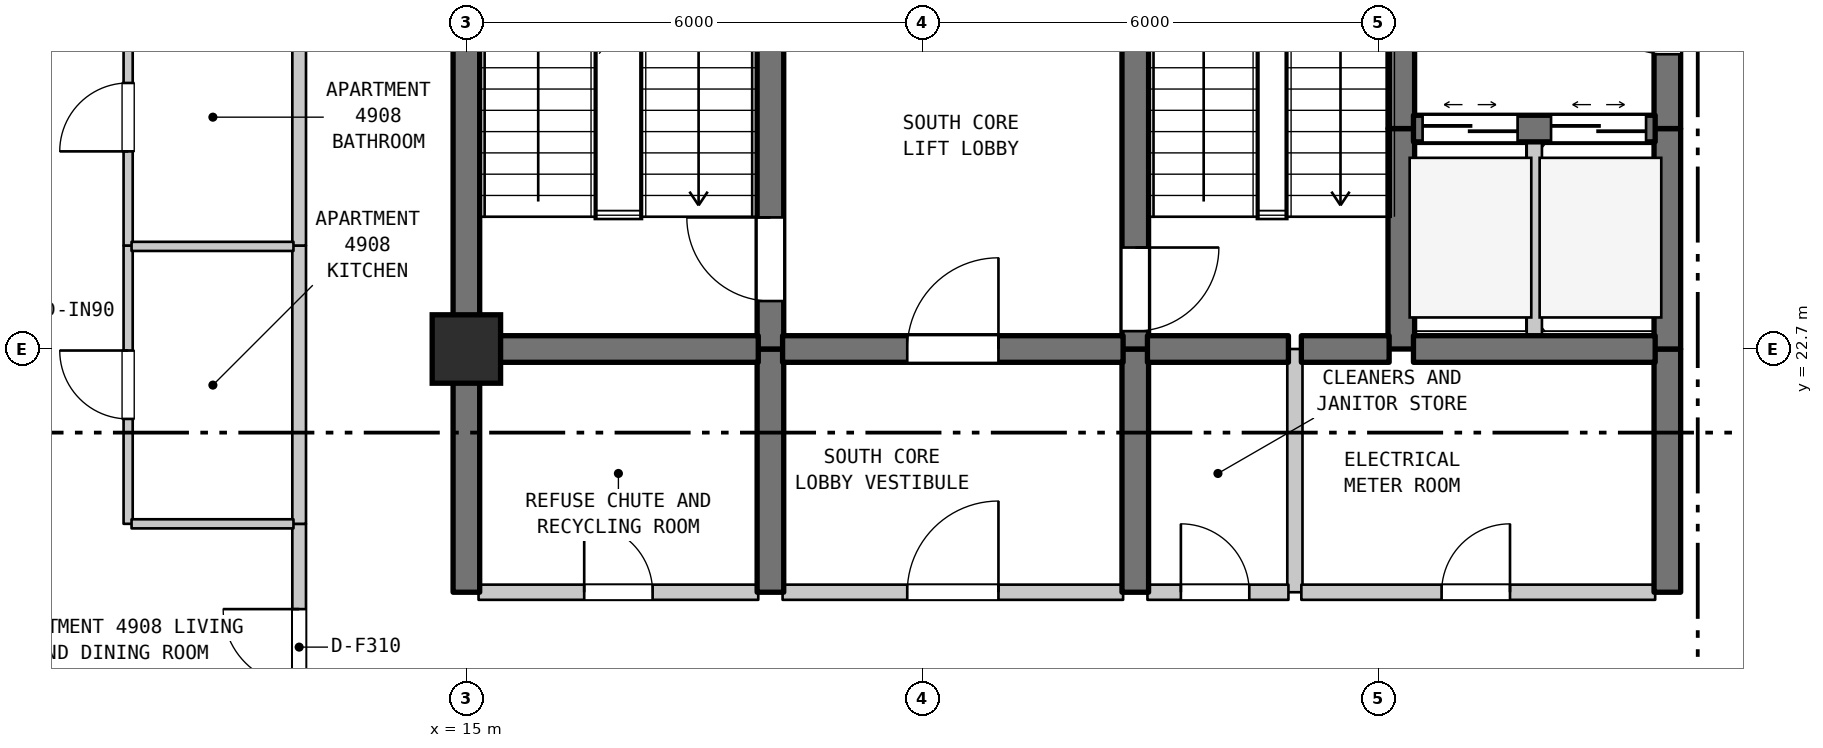
"""IFC4 building model, lengths in metres.
Left out: names, types, materials, properties, quantities, classifications, styles, units other than length and angle.
Written with IfcOpenShell. Run it as: python <this file> out.ifc"""

import sys

from ifc_helpers import new_model, si_unit, direction, frame, frame_2d, origin, origin_2d, place, context, subcontext, project, spatial, rectangle, extrude, element, fill, save


model = new_model("IFC4")
c1 = context("Model", 3, precision=1e-05, world=origin(), true_north=direction((0.0, 1.0)))
c2 = subcontext(c1, "Body", "Model", "MODEL_VIEW")
j1 = project(units=[si_unit("LENGTHUNIT", "METRE"), si_unit("PLANEANGLEUNIT", "RADIAN")], contexts=[c1])
p1 = place(None, origin())
s1 = spatial("IfcSite", under=j1, at=p1, CompositionType="ELEMENT")
p2 = place(p1, origin())
s2 = spatial("IfcBuilding", under=s1, at=p2, CompositionType="ELEMENT")
p3 = place(p2, frame((0.0, 0.0, 199.5)))
s3 = spatial("IfcBuildingStorey", under=s2, at=p3, CompositionType="ELEMENT", Elevation=199.5)
p4 = place(p3, frame((15.0, 22.7, 0.0), z_axis=(0.0, 0.0, 1.0), x_axis=(1.0, 0.0, 0.0)))
e1 = element("IfcColumn", 1, at=p4, inside=s3, PredefinedType="COLUMN", context=c2, shape_type="SweptSolid", body=[
    extrude(rectangle(XDim=0.9, YDim=0.9, at=origin_2d()), origin(), (0.0, 0.0, 1.0), 3.7),
])
p5 = place(p3, frame((10.55, 20.4, 0.0), z_axis=(0.0, 0.0, 1.0), x_axis=(0.0, 1.0, 0.0)))
e2 = element("IfcWall", 2, at=p5, inside=s3, PredefinedType="PARTITIONING", context=c2, shape_type="SweptSolid", body=[
    extrude(rectangle(XDim=3.661, YDim=0.12, at=frame_2d((1.831, 0.0))), origin(), (0.0, 0.0, 1.0), 3.39),
])
p6 = place(p5, frame((1.38, 0.0, 0.0)))
e3 = element("IfcOpeningElement", 3, at=p6, cuts=e2, PredefinedType="OPENING", context=c2, shape_type="SweptSolid", body=[
    extrude(rectangle(XDim=0.9, YDim=2.15, at=frame_2d((0.45, 1.075))), frame((0.0, 0.07, 0.0), z_axis=(0.0, -1.0, 0.0), x_axis=(1.0, 0.0, 0.0)), (0.0, 0.0, 1.0), 0.14),
])
p7 = place(p3, frame((10.55, 24.061, 0.0), z_axis=(0.0, 0.0, 1.0), x_axis=(0.0, 1.0, 0.0)))
e4 = element("IfcWall", 4, at=p7, inside=s3, PredefinedType="PARTITIONING", context=c2, shape_type="SweptSolid", body=[
    extrude(rectangle(XDim=3.379, YDim=0.12, at=frame_2d((1.689, 0.0))), origin(), (0.0, 0.0, 1.0), 3.39),
])
p8 = place(p7, frame((1.239, 0.0, 0.0)))
e5 = element("IfcOpeningElement", 5, at=p8, cuts=e4, PredefinedType="OPENING", context=c2, shape_type="SweptSolid", body=[
    extrude(rectangle(XDim=0.9, YDim=2.1, at=frame_2d((0.45, 1.05))), frame((0.0, 0.07, 0.0), z_axis=(0.0, -1.0, 0.0), x_axis=(1.0, 0.0, 0.0)), (0.0, 0.0, 1.0), 0.14),
])
p9 = place(p3, frame((12.8, 17.3, 0.0), z_axis=(0.0, 0.0, 1.0), x_axis=(0.0, 1.0, 0.0)))
e6 = element("IfcWall", 6, at=p9, inside=s3, PredefinedType="STANDARD", context=c2, shape_type="SweptSolid", body=[
    extrude(rectangle(XDim=3.1, YDim=0.18, at=frame_2d((1.55, 0.0))), origin(), (0.0, 0.0, 1.0), 3.39),
])
p10 = place(p9, frame((0.978, 0.0, 0.0)))
e7 = element("IfcOpeningElement", 7, at=p10, cuts=e6, PredefinedType="OPENING", context=c2, shape_type="SweptSolid", body=[
    extrude(rectangle(XDim=1.0, YDim=2.15, at=frame_2d((0.5, 1.075))), frame((0.0, 0.1, 0.0), z_axis=(0.0, -1.0, 0.0), x_axis=(1.0, 0.0, 0.0)), (0.0, 0.0, 1.0), 0.2),
])
p11 = place(p3, frame((12.8, 20.4, 0.0), z_axis=(0.0, 0.0, 1.0), x_axis=(0.0, 1.0, 0.0)))
e8 = element("IfcWall", 8, at=p11, inside=s3, PredefinedType="STANDARD", context=c2, shape_type="SweptSolid", body=[
    extrude(rectangle(XDim=3.661, YDim=0.18, at=frame_2d((1.831, 0.0))), origin(), (0.0, 0.0, 1.0), 3.39),
])
p12 = place(p3, frame((12.8, 24.061, 0.0), z_axis=(0.0, 0.0, 1.0), x_axis=(0.0, 1.0, 0.0)))
e9 = element("IfcWall", 9, at=p12, inside=s3, PredefinedType="STANDARD", context=c2, shape_type="SweptSolid", body=[
    extrude(rectangle(XDim=3.379, YDim=0.18, at=frame_2d((1.689, 0.0))), origin(), (0.0, 0.0, 1.0), 3.39),
])
p13 = place(p3, frame((15.0, 19.5, 0.0), z_axis=(0.0, 0.0, 1.0), x_axis=(0.0, 1.0, 0.0)))
e10 = element("IfcWall", 10, at=p13, inside=s3, PredefinedType="SHEAR", context=c2, shape_type="SweptSolid", body=[
    extrude(rectangle(XDim=3.2, YDim=0.35, at=frame_2d((1.6, 0.0))), origin(), (0.0, 0.0, 1.0), 3.39),
])
p14 = place(p3, frame((15.0, 22.7, 0.0), z_axis=(0.0, 0.0, 1.0), x_axis=(0.0, 1.0, 0.0)))
e11 = element("IfcWall", 11, at=p14, inside=s3, PredefinedType="SHEAR", context=c2, shape_type="SweptSolid", body=[
    extrude(rectangle(XDim=6.8, YDim=0.35, at=frame_2d((3.4, 0.0))), origin(), (0.0, 0.0, 1.0), 3.39),
])
p15 = place(p3, frame((19.0, 19.5, 0.0), z_axis=(0.0, 0.0, 1.0), x_axis=(0.0, 1.0, 0.0)))
e12 = element("IfcWall", 12, at=p15, inside=s3, PredefinedType="SHEAR", context=c2, shape_type="SweptSolid", body=[
    extrude(rectangle(XDim=3.2, YDim=0.35, at=frame_2d((1.6, 0.0))), origin(), (0.0, 0.0, 1.0), 3.39),
])
p16 = place(p3, frame((19.0, 22.7, 0.0), z_axis=(0.0, 0.0, 1.0), x_axis=(0.0, 1.0, 0.0)))
e13 = element("IfcWall", 13, at=p16, inside=s3, PredefinedType="SHEAR", context=c2, shape_type="SweptSolid", body=[
    extrude(rectangle(XDim=5.5, YDim=0.35, at=frame_2d((2.75, 0.0))), origin(), (0.0, 0.0, 1.0), 3.39),
])
p17 = place(p16, frame((0.631, 0.0, 0.0)))
e14 = element("IfcOpeningElement", 14, at=p17, cuts=e13, PredefinedType="OPENING", context=c2, shape_type="SweptSolid", body=[
    extrude(rectangle(XDim=1.1, YDim=2.15, at=frame_2d((0.55, 1.075))), frame((0.0, 0.185, 0.0), z_axis=(0.0, -1.0, 0.0), x_axis=(1.0, 0.0, 0.0)), (0.0, 0.0, 1.0), 0.37),
])
p18 = place(p3, frame((23.8, 19.5, 0.0), z_axis=(0.0, 0.0, 1.0), x_axis=(0.0, 1.0, 0.0)))
e15 = element("IfcWall", 15, at=p18, inside=s3, PredefinedType="SHEAR", context=c2, shape_type="SweptSolid", body=[
    extrude(rectangle(XDim=3.2, YDim=0.35, at=frame_2d((1.6, 0.0))), origin(), (0.0, 0.0, 1.0), 3.39),
])
p19 = place(p3, frame((23.8, 22.7, 0.0), z_axis=(0.0, 0.0, 1.0), x_axis=(0.0, 1.0, 0.0)))
e16 = element("IfcWall", 16, at=p19, inside=s3, PredefinedType="SHEAR", context=c2, shape_type="SweptSolid", body=[
    extrude(rectangle(XDim=5.5, YDim=0.35, at=frame_2d((2.75, 0.0))), origin(), (0.0, 0.0, 1.0), 3.39),
])
p20 = place(p19, frame((0.235, 0.0, 0.0)))
e17 = element("IfcOpeningElement", 17, at=p20, cuts=e16, PredefinedType="OPENING", context=c2, shape_type="SweptSolid", body=[
    extrude(rectangle(XDim=1.1, YDim=2.15, at=frame_2d((0.55, 1.075))), frame((0.0, 0.185, 0.0), z_axis=(0.0, -1.0, 0.0), x_axis=(1.0, 0.0, 0.0)), (0.0, 0.0, 1.0), 0.37),
])
p21 = place(p3, frame((25.9, 19.5, 0.0), z_axis=(0.0, 0.0, 1.0), x_axis=(0.0, 1.0, 0.0)))
e18 = element("IfcWall", 18, at=p21, inside=s3, PredefinedType="STANDARD", context=c2, shape_type="SweptSolid", body=[
    extrude(rectangle(XDim=3.2, YDim=0.2, at=frame_2d((1.6, 0.0))), origin(), (0.0, 0.0, 1.0), 3.39),
])
p22 = place(p3, frame((27.3, 22.7, 0.0), z_axis=(0.0, 0.0, 1.0), x_axis=(0.0, 1.0, 0.0)))
e19 = element("IfcWall", 19, at=p22, inside=s3, PredefinedType="SHEAR", context=c2, shape_type="SweptSolid", body=[
    extrude(rectangle(XDim=2.9, YDim=0.35, at=frame_2d((1.45, 0.0))), origin(), (0.0, 0.0, 1.0), 3.39),
])
p23 = place(p3, frame((27.3, 25.6, 0.0), z_axis=(0.0, 0.0, 1.0), x_axis=(0.0, 1.0, 0.0)))
e20 = element("IfcWall", 20, at=p23, inside=s3, PredefinedType="SHEAR", context=c2, shape_type="SweptSolid", body=[
    extrude(rectangle(XDim=3.3, YDim=0.35, at=frame_2d((1.65, 0.0))), origin(), (0.0, 0.0, 1.0), 3.39),
])
p24 = place(p3, frame((29.05, 22.7, 0.0), z_axis=(0.0, 0.0, 1.0), x_axis=(0.0, 1.0, 0.0)))
e21 = element("IfcWall", 21, at=p24, inside=s3, PredefinedType="STANDARD", context=c2, shape_type="SweptSolid", body=[
    extrude(rectangle(XDim=2.9, YDim=0.2, at=frame_2d((1.45, 0.0))), origin(), (0.0, 0.0, 1.0), 3.39),
])
p25 = place(p3, frame((30.8, 19.5, 0.0), z_axis=(0.0, 0.0, 1.0), x_axis=(0.0, 1.0, 0.0)))
e22 = element("IfcWall", 22, at=p25, inside=s3, PredefinedType="SHEAR", context=c2, shape_type="SweptSolid", body=[
    extrude(rectangle(XDim=3.2, YDim=0.35, at=frame_2d((1.6, 0.0))), origin(), (0.0, 0.0, 1.0), 3.39),
])
p26 = place(p3, frame((30.8, 22.7, 0.0), z_axis=(0.0, 0.0, 1.0), x_axis=(0.0, 1.0, 0.0)))
e23 = element("IfcWall", 23, at=p26, inside=s3, PredefinedType="SHEAR", context=c2, shape_type="SweptSolid", body=[
    extrude(rectangle(XDim=2.9, YDim=0.35, at=frame_2d((1.45, 0.0))), origin(), (0.0, 0.0, 1.0), 3.39),
])
p27 = place(p3, frame((30.8, 25.6, 0.0), z_axis=(0.0, 0.0, 1.0), x_axis=(0.0, 1.0, 0.0)))
e24 = element("IfcWall", 24, at=p27, inside=s3, PredefinedType="SHEAR", context=c2, shape_type="SweptSolid", body=[
    extrude(rectangle(XDim=3.3, YDim=0.35, at=frame_2d((1.65, 0.0))), origin(), (0.0, 0.0, 1.0), 3.39),
])
p28 = place(p27, frame((0.978, 0.0, 0.0)))
e25 = element("IfcOpeningElement", 25, at=p28, cuts=e24, PredefinedType="OPENING", context=c2, shape_type="SweptSolid", body=[
    extrude(rectangle(XDim=1.2, YDim=2.2, at=frame_2d((0.6, 1.1))), frame((0.0, 0.185, 0.0), z_axis=(0.0, -1.0, 0.0), x_axis=(1.0, 0.0, 0.0)), (0.0, 0.0, 1.0), 0.37),
])
p29 = place(p3, frame((15.16, 19.5, 0.0), z_axis=(0.0, 0.0, 1.0), x_axis=(1.0, 0.0, 0.0)))
e26 = element("IfcWall", 26, at=p29, inside=s3, PredefinedType="STANDARD", context=c2, shape_type="SweptSolid", body=[
    extrude(rectangle(XDim=3.68, YDim=0.2, at=frame_2d((1.84, 0.0))), origin(), (0.0, 0.0, 1.0), 3.39),
])
p30 = place(p29, frame((1.39, 0.0, 0.0)))
e27 = element("IfcOpeningElement", 27, at=p30, cuts=e26, PredefinedType="OPENING", context=c2, shape_type="SweptSolid", body=[
    extrude(rectangle(XDim=0.9, YDim=2.15, at=frame_2d((0.45, 1.075))), frame((0.0, 0.11, 0.0), z_axis=(0.0, -1.0, 0.0), x_axis=(1.0, 0.0, 0.0)), (0.0, 0.0, 1.0), 0.22),
])
p31 = place(p3, frame((19.16, 19.5, 0.0), z_axis=(0.0, 0.0, 1.0), x_axis=(1.0, 0.0, 0.0)))
e28 = element("IfcWall", 28, at=p31, inside=s3, PredefinedType="STANDARD", context=c2, shape_type="SweptSolid", body=[
    extrude(rectangle(XDim=4.48, YDim=0.2, at=frame_2d((2.24, 0.0))), origin(), (0.0, 0.0, 1.0), 3.39),
])
p32 = place(p31, frame((1.64, 0.0, 0.0)))
e29 = element("IfcOpeningElement", 29, at=p32, cuts=e28, PredefinedType="OPENING", context=c2, shape_type="SweptSolid", body=[
    extrude(rectangle(XDim=1.2, YDim=2.2, at=frame_2d((0.6, 1.1))), frame((0.0, 0.11, 0.0), z_axis=(0.0, -1.0, 0.0), x_axis=(1.0, 0.0, 0.0)), (0.0, 0.0, 1.0), 0.22),
])
p33 = place(p3, frame((23.96, 19.5, 0.0), z_axis=(0.0, 0.0, 1.0), x_axis=(1.0, 0.0, 0.0)))
e30 = element("IfcWall", 30, at=p33, inside=s3, PredefinedType="STANDARD", context=c2, shape_type="SweptSolid", body=[
    extrude(rectangle(XDim=1.855, YDim=0.2, at=frame_2d((0.927, 0.0))), origin(), (0.0, 0.0, 1.0), 3.39),
])
p34 = place(p33, frame((0.44, 0.0, 0.0)))
e31 = element("IfcOpeningElement", 31, at=p34, cuts=e30, PredefinedType="OPENING", context=c2, shape_type="SweptSolid", body=[
    extrude(rectangle(XDim=0.9, YDim=2.15, at=frame_2d((0.45, 1.075))), frame((0.0, 0.11, 0.0), z_axis=(0.0, -1.0, 0.0), x_axis=(1.0, 0.0, 0.0)), (0.0, 0.0, 1.0), 0.22),
])
p35 = place(p3, frame((25.985, 19.5, 0.0), z_axis=(0.0, 0.0, 1.0), x_axis=(1.0, 0.0, 0.0)))
e32 = element("IfcWall", 32, at=p35, inside=s3, PredefinedType="STANDARD", context=c2, shape_type="SweptSolid", body=[
    extrude(rectangle(XDim=4.655, YDim=0.2, at=frame_2d((2.327, 0.0))), origin(), (0.0, 0.0, 1.0), 3.39),
])
p36 = place(p35, frame((1.845, 0.0, 0.0)))
e33 = element("IfcOpeningElement", 33, at=p36, cuts=e32, PredefinedType="OPENING", context=c2, shape_type="SweptSolid", body=[
    extrude(rectangle(XDim=0.9, YDim=2.15, at=frame_2d((0.45, 1.075))), frame((0.0, 0.11, 0.0), z_axis=(0.0, -1.0, 0.0), x_axis=(1.0, 0.0, 0.0)), (0.0, 0.0, 1.0), 0.22),
])
p37 = place(p3, frame((10.595, 20.4, 0.0), z_axis=(0.0, 0.0, 1.0), x_axis=(1.0, 0.0, 0.0)))
e34 = element("IfcWall", 34, at=p37, inside=s3, PredefinedType="PARTITIONING", context=c2, shape_type="SweptSolid", body=[
    extrude(rectangle(XDim=2.13, YDim=0.12, at=frame_2d((1.065, 0.0))), origin(), (0.0, 0.0, 1.0), 3.39),
])
p38 = place(p3, frame((15.16, 22.7, 0.0), z_axis=(0.0, 0.0, 1.0), x_axis=(1.0, 0.0, 0.0)))
e35 = element("IfcWall", 35, at=p38, inside=s3, PredefinedType="SHEAR", context=c2, shape_type="SweptSolid", body=[
    extrude(rectangle(XDim=3.68, YDim=0.35, at=frame_2d((1.84, 0.0))), origin(), (0.0, 0.0, 1.0), 3.39),
])
p39 = place(p3, frame((19.16, 22.7, 0.0), z_axis=(0.0, 0.0, 1.0), x_axis=(1.0, 0.0, 0.0)))
e36 = element("IfcWall", 36, at=p39, inside=s3, PredefinedType="SHEAR", context=c2, shape_type="SweptSolid", body=[
    extrude(rectangle(XDim=4.48, YDim=0.35, at=frame_2d((2.24, 0.0))), origin(), (0.0, 0.0, 1.0), 3.39),
])
p40 = place(p39, frame((1.64, 0.0, 0.0)))
e37 = element("IfcOpeningElement", 37, at=p40, cuts=e36, PredefinedType="OPENING", context=c2, shape_type="SweptSolid", body=[
    extrude(rectangle(XDim=1.2, YDim=2.2, at=frame_2d((0.6, 1.1))), frame((0.0, 0.185, 0.0), z_axis=(0.0, -1.0, 0.0), x_axis=(1.0, 0.0, 0.0)), (0.0, 0.0, 1.0), 0.37),
])
p41 = place(p3, frame((23.96, 22.7, 0.0), z_axis=(0.0, 0.0, 1.0), x_axis=(1.0, 0.0, 0.0)))
e38 = element("IfcWall", 38, at=p41, inside=s3, PredefinedType="SHEAR", context=c2, shape_type="SweptSolid", body=[
    extrude(rectangle(XDim=1.855, YDim=0.35, at=frame_2d((0.927, 0.0))), origin(), (0.0, 0.0, 1.0), 3.39),
])
p42 = place(p3, frame((25.985, 22.7, 0.0), z_axis=(0.0, 0.0, 1.0), x_axis=(1.0, 0.0, 0.0)))
e39 = element("IfcWall", 39, at=p42, inside=s3, PredefinedType="SHEAR", context=c2, shape_type="SweptSolid", body=[
    extrude(rectangle(XDim=1.155, YDim=0.35, at=frame_2d((0.577, 0.0))), origin(), (0.0, 0.0, 1.0), 3.39),
])
p43 = place(p3, frame((27.46, 22.7, 0.0), z_axis=(0.0, 0.0, 1.0), x_axis=(1.0, 0.0, 0.0)))
e40 = element("IfcWall", 40, at=p43, inside=s3, PredefinedType="SHEAR", context=c2, shape_type="SweptSolid", body=[
    extrude(rectangle(XDim=3.18, YDim=0.35, at=frame_2d((1.59, 0.0))), origin(), (0.0, 0.0, 1.0), 3.39),
])
p44 = place(p3, frame((10.595, 24.05, 0.0), z_axis=(0.0, 0.0, 1.0), x_axis=(1.0, 0.0, 0.0)))
e41 = element("IfcWall", 41, at=p44, inside=s3, PredefinedType="PARTITIONING", context=c2, shape_type="SweptSolid", body=[
    extrude(rectangle(XDim=2.13, YDim=0.12, at=frame_2d((1.065, 0.0))), origin(), (0.0, 0.0, 1.0), 3.39),
])
p45 = place(p3, frame((27.46, 25.6, 0.0), z_axis=(0.0, 0.0, 1.0), x_axis=(1.0, 0.0, 0.0)))
e42 = element("IfcWall", 42, at=p45, inside=s3, PredefinedType="SHEAR", context=c2, shape_type="SweptSolid", body=[
    extrude(rectangle(XDim=3.18, YDim=0.35, at=frame_2d((1.59, 0.0))), origin(), (0.0, 0.0, 1.0), 3.39),
])
p46 = place(p45, frame((0.12, 0.0, 0.0)))
e43 = element("IfcOpeningElement", 43, at=p46, cuts=e42, PredefinedType="OPENING", context=c2, shape_type="SweptSolid", body=[
    extrude(rectangle(XDim=1.25, YDim=2.2, at=frame_2d((0.625, 1.1))), frame((0.0, 0.185, 0.0), z_axis=(0.0, -1.0, 0.0), x_axis=(1.0, 0.0, 0.0)), (0.0, 0.0, 1.0), 0.37),
])
p47 = place(p45, frame((1.81, 0.0, 0.0)))
e44 = element("IfcOpeningElement", 44, at=p47, cuts=e42, PredefinedType="OPENING", context=c2, shape_type="SweptSolid", body=[
    extrude(rectangle(XDim=1.25, YDim=2.2, at=frame_2d((0.625, 1.1))), frame((0.0, 0.185, 0.0), z_axis=(0.0, -1.0, 0.0), x_axis=(1.0, 0.0, 0.0)), (0.0, 0.0, 1.0), 0.37),
])
p48 = place(p6, origin())
e45 = element("IfcDoor", 45, at=p48, inside=s3, OperationType="SINGLE_SWING_RIGHT", PredefinedType="DOOR", context=c2, shape_type="SweptSolid", body=[
    extrude(rectangle(XDim=0.9, YDim=2.15, at=frame_2d((0.45, 1.075))), frame((0.0, 0.025, 0.0), z_axis=(0.0, -1.0, 0.0), x_axis=(1.0, 0.0, 0.0)), (0.0, 0.0, 1.0), 0.05),
])
fill(e3, e45)
p49 = place(p8, origin())
e46 = element("IfcDoor", 46, at=p49, inside=s3, OperationType="SINGLE_SWING_LEFT", PredefinedType="DOOR", context=c2, shape_type="SweptSolid", body=[
    extrude(rectangle(XDim=0.9, YDim=2.1, at=frame_2d((0.45, 1.05))), frame((0.0, 0.025, 0.0), z_axis=(0.0, -1.0, 0.0), x_axis=(1.0, 0.0, 0.0)), (0.0, 0.0, 1.0), 0.05),
])
fill(e5, e46)
p50 = place(p10, origin())
e47 = element("IfcDoor", 47, at=p50, inside=s3, OperationType="SINGLE_SWING_RIGHT", PredefinedType="DOOR", context=c2, shape_type="SweptSolid", body=[
    extrude(rectangle(XDim=1.0, YDim=2.15, at=frame_2d((0.5, 1.075))), frame((0.0, 0.025, 0.0), z_axis=(0.0, -1.0, 0.0), x_axis=(1.0, 0.0, 0.0)), (0.0, 0.0, 1.0), 0.05),
])
fill(e7, e47)
p51 = place(p17, origin())
e48 = element("IfcDoor", 48, at=p51, inside=s3, OperationType="SINGLE_SWING_RIGHT", PredefinedType="DOOR", context=c2, shape_type="SweptSolid", body=[
    extrude(rectangle(XDim=1.1, YDim=2.15, at=frame_2d((0.55, 1.075))), frame((0.0, 0.025, 0.0), z_axis=(0.0, -1.0, 0.0), x_axis=(1.0, 0.0, 0.0)), (0.0, 0.0, 1.0), 0.05),
])
fill(e14, e48)
p52 = place(p20, frame((1.1, 0.0, 0.0), z_axis=(0.0, 0.0, 1.0), x_axis=(-1.0, 0.0, 0.0)))
e49 = element("IfcDoor", 49, at=p52, inside=s3, OperationType="SINGLE_SWING_RIGHT", PredefinedType="DOOR", context=c2, shape_type="SweptSolid", body=[
    extrude(rectangle(XDim=1.1, YDim=2.15, at=frame_2d((0.55, 1.075))), frame((0.0, 0.025, 0.0), z_axis=(0.0, -1.0, 0.0), x_axis=(1.0, 0.0, 0.0)), (0.0, 0.0, 1.0), 0.05),
])
fill(e17, e49)
p53 = place(p28, origin())
e50 = element("IfcDoor", 50, at=p53, inside=s3, OperationType="SINGLE_SWING_RIGHT", PredefinedType="DOOR", context=c2, shape_type="SweptSolid", body=[
    extrude(rectangle(XDim=1.2, YDim=2.2, at=frame_2d((0.6, 1.1))), frame((0.0, 0.025, 0.0), z_axis=(0.0, -1.0, 0.0), x_axis=(1.0, 0.0, 0.0)), (0.0, 0.0, 1.0), 0.05),
])
fill(e25, e50)
p54 = place(p30, origin())
e51 = element("IfcDoor", 51, at=p54, inside=s3, OperationType="SINGLE_SWING_LEFT", PredefinedType="DOOR", context=c2, shape_type="SweptSolid", body=[
    extrude(rectangle(XDim=0.9, YDim=2.15, at=frame_2d((0.45, 1.075))), frame((0.0, 0.025, 0.0), z_axis=(0.0, -1.0, 0.0), x_axis=(1.0, 0.0, 0.0)), (0.0, 0.0, 1.0), 0.05),
])
fill(e27, e51)
p55 = place(p32, origin())
e52 = element("IfcDoor", 52, at=p55, inside=s3, OperationType="SINGLE_SWING_RIGHT", PredefinedType="DOOR", context=c2, shape_type="SweptSolid", body=[
    extrude(rectangle(XDim=1.2, YDim=2.2, at=frame_2d((0.6, 1.1))), frame((0.0, 0.025, 0.0), z_axis=(0.0, -1.0, 0.0), x_axis=(1.0, 0.0, 0.0)), (0.0, 0.0, 1.0), 0.05),
])
fill(e29, e52)
p56 = place(p34, origin())
e53 = element("IfcDoor", 53, at=p56, inside=s3, OperationType="SINGLE_SWING_LEFT", PredefinedType="DOOR", context=c2, shape_type="SweptSolid", body=[
    extrude(rectangle(XDim=0.9, YDim=2.15, at=frame_2d((0.45, 1.075))), frame((0.0, 0.025, 0.0), z_axis=(0.0, -1.0, 0.0), x_axis=(1.0, 0.0, 0.0)), (0.0, 0.0, 1.0), 0.05),
])
fill(e31, e53)
p57 = place(p36, origin())
e54 = element("IfcDoor", 54, at=p57, inside=s3, OperationType="SINGLE_SWING_RIGHT", PredefinedType="DOOR", context=c2, shape_type="SweptSolid", body=[
    extrude(rectangle(XDim=0.9, YDim=2.15, at=frame_2d((0.45, 1.075))), frame((0.0, 0.025, 0.0), z_axis=(0.0, -1.0, 0.0), x_axis=(1.0, 0.0, 0.0)), (0.0, 0.0, 1.0), 0.05),
])
fill(e33, e54)
p58 = place(p40, origin())
e55 = element("IfcDoor", 55, at=p58, inside=s3, OperationType="SINGLE_SWING_RIGHT", PredefinedType="DOOR", context=c2, shape_type="SweptSolid", body=[
    extrude(rectangle(XDim=1.2, YDim=2.2, at=frame_2d((0.6, 1.1))), frame((0.0, 0.025, 0.0), z_axis=(0.0, -1.0, 0.0), x_axis=(1.0, 0.0, 0.0)), (0.0, 0.0, 1.0), 0.05),
])
fill(e37, e55)
p59 = place(p46, origin())
e56 = element("IfcDoor", 56, at=p59, inside=s3, OperationType="DOUBLE_DOOR_SLIDING", PredefinedType="DOOR", context=c2, shape_type="SweptSolid", body=[
    extrude(rectangle(XDim=1.25, YDim=2.2, at=frame_2d((0.625, 1.1))), frame((0.0, 0.025, 0.0), z_axis=(0.0, -1.0, 0.0), x_axis=(1.0, 0.0, 0.0)), (0.0, 0.0, 1.0), 0.05),
])
fill(e43, e56)
p60 = place(p47, origin())
e57 = element("IfcDoor", 57, at=p60, inside=s3, OperationType="DOUBLE_DOOR_SLIDING", PredefinedType="DOOR", context=c2, shape_type="SweptSolid", body=[
    extrude(rectangle(XDim=1.25, YDim=2.2, at=frame_2d((0.625, 1.1))), frame((0.0, 0.025, 0.0), z_axis=(0.0, -1.0, 0.0), x_axis=(1.0, 0.0, 0.0)), (0.0, 0.0, 1.0), 0.05),
])
fill(e44, e57)
save(model, sys.argv[1])
